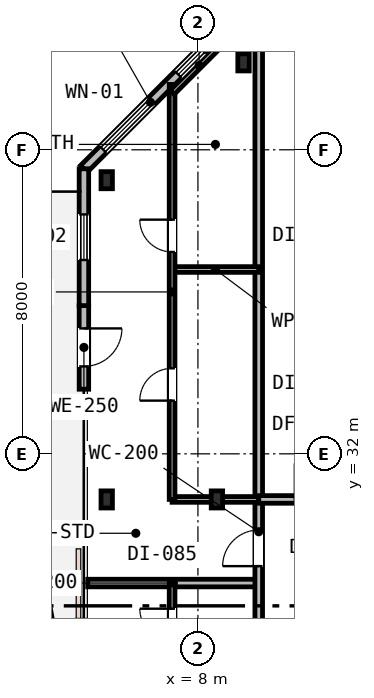
"""IFC4 building model, lengths in metres.
Left out: names, types, materials, properties, quantities, classifications, styles, units other than length and angle.
Written with IfcOpenShell. Run it as: python <this file> out.ifc"""

import sys

from ifc_helpers import new_model, si_unit, direction, frame, frame_2d, origin, origin_2d, place, context, subcontext, project, spatial, rectangle, i_section, extrude, element, fill, save


model = new_model("IFC4")
c1 = context("Model", 3, precision=1e-05, world=origin(), true_north=direction((0.0, 1.0)))
c2 = subcontext(c1, "Body", "Model", "MODEL_VIEW")
j1 = project(units=[si_unit("LENGTHUNIT", "METRE"), si_unit("PLANEANGLEUNIT", "RADIAN")], contexts=[c1])
p1 = place(None, origin())
s1 = spatial("IfcSite", under=j1, at=p1, CompositionType="ELEMENT")
p2 = place(p1, origin())
s2 = spatial("IfcBuilding", under=s1, at=p2, CompositionType="ELEMENT")
p3 = place(p2, frame((0.0, 0.0, 193.8)))
s3 = spatial("IfcBuildingStorey", under=s2, at=p3, CompositionType="ELEMENT", Elevation=193.8)
for number, where, z_axis, x_axis in (
    (1, (5.6, 30.8, 0.0), (0.0, 0.0, 1.0), (1.0, 0.0, 0.0)),
    (2, (5.6, 39.2, 0.0), (0.0, 0.0, 1.0), (1.0, 0.0, 0.0)),
    (3, (8.5, 30.8, 0.0), (0.0, 0.0, 1.0), (1.0, 0.0, 0.0)),
    (4, (9.2, 42.3, 0.0), (0.0, 0.0, 1.0), (1.0, 0.0, 0.0)),
):
    element("IfcColumn", number, at=place(p3, frame(where, z_axis=z_axis, x_axis=x_axis)), inside=s3, PredefinedType="COLUMN", context=c2, shape_type="SweptSolid", body=[
        extrude(i_section(OverallWidth=0.3, OverallDepth=0.45, WebThickness=0.014, FlangeThickness=0.026, FilletRadius=0.027, at=origin_2d()), origin(), (0.0, 0.0, 1.0), 3.6),
    ])
p4 = place(p3, frame((8.5, 43.0, 0.0), z_axis=(0.0, 0.0, 1.0), x_axis=(-0.707106781187, -0.707106781187, 0.0)))
e5 = element("IfcWall", 5, at=p4, inside=s3, PredefinedType="STANDARD", context=c2, shape_type="SweptSolid", body=[
    extrude(rectangle(XDim=4.95, YDim=0.25, at=frame_2d((2.475, 0.0))), origin(), (0.0, 0.0, 1.0), 3.33),
])
p5 = place(p4, frame((0.54, 0.0, 0.9)))
e6 = element("IfcOpeningElement", 6, at=p5, cuts=e5, PredefinedType="OPENING", context=c2, shape_type="SweptSolid", body=[
    extrude(rectangle(XDim=0.9, YDim=1.55, at=frame_2d((0.45, 0.775))), frame((0.0, 0.135, 0.0), z_axis=(0.0, -1.0, 0.0), x_axis=(1.0, 0.0, 0.0)), (0.0, 0.0, 1.0), 0.27),
])
p6 = place(p4, frame((2.435, 0.0, 0.75)))
e7 = element("IfcOpeningElement", 7, at=p6, cuts=e5, PredefinedType="OPENING", context=c2, shape_type="SweptSolid", body=[
    extrude(rectangle(XDim=1.8, YDim=1.85, at=frame_2d((0.9, 0.925))), frame((0.0, 0.135, 0.0), z_axis=(0.0, -1.0, 0.0), x_axis=(1.0, 0.0, 0.0)), (0.0, 0.0, 1.0), 0.27),
])
p7 = place(p3, frame((5.0, 35.9, 0.0), z_axis=(0.0, 0.0, 1.0), x_axis=(0.0, -1.0, 0.0)))
e8 = element("IfcWall", 8, at=p7, inside=s3, PredefinedType="STANDARD", context=c2, shape_type="SweptSolid", body=[
    extrude(rectangle(XDim=2.2, YDim=0.25, at=frame_2d((1.1, 0.0))), origin(), (0.0, 0.0, 1.0), 3.33),
])
p8 = place(p7, frame((0.6, 0.0, 0.0)))
e9 = element("IfcOpeningElement", 9, at=p8, cuts=e8, PredefinedType="OPENING", context=c2, shape_type="SweptSolid", body=[
    extrude(rectangle(XDim=1.0, YDim=2.15, at=frame_2d((0.5, 1.075))), frame((0.0, 0.135, 0.0), z_axis=(0.0, -1.0, 0.0), x_axis=(1.0, 0.0, 0.0)), (0.0, 0.0, 1.0), 0.27),
])
p9 = place(p3, frame((5.0, 39.5, 0.0), z_axis=(0.0, 0.0, 1.0), x_axis=(0.0, -1.0, 0.0)))
e10 = element("IfcWall", 10, at=p9, inside=s3, PredefinedType="STANDARD", context=c2, shape_type="SweptSolid", body=[
    extrude(rectangle(XDim=3.6, YDim=0.25, at=frame_2d((1.8, 0.0))), origin(), (0.0, 0.0, 1.0), 3.33),
])
p10 = place(p9, frame((1.2, 0.0, 0.85)))
e11 = element("IfcOpeningElement", 11, at=p10, cuts=e10, PredefinedType="OPENING", context=c2, shape_type="SweptSolid", body=[
    extrude(rectangle(XDim=1.2, YDim=1.6, at=frame_2d((0.6, 0.8))), frame((0.0, 0.135, 0.0), z_axis=(0.0, -1.0, 0.0), x_axis=(1.0, 0.0, 0.0)), (0.0, 0.0, 1.0), 0.27),
])
p11 = place(p3, frame((5.1, 28.6, 0.0), z_axis=(0.0, 0.0, 1.0), x_axis=(1.0, 0.0, 0.0)))
e12 = element("IfcWall", 12, at=p11, inside=s3, PredefinedType="PARTITIONING", context=c2, shape_type="SweptSolid", body=[
    extrude(rectangle(XDim=4.5, YDim=0.2, at=frame_2d((2.25, 0.0))), origin(), (0.0, 0.0, 1.0), 2.92),
])
p12 = place(p3, frame((9.6, 17.0, 0.0), z_axis=(0.0, 0.0, 1.0), x_axis=(0.0, 1.0, 0.0)))
e13 = element("IfcWall", 13, at=p12, inside=s3, PredefinedType="PARTITIONING", context=c2, shape_type="SweptSolid", body=[
    extrude(rectangle(XDim=25.9, YDim=0.2, at=frame_2d((12.95, 0.0))), origin(), (0.0, 0.0, 1.0), 2.92),
])
p13 = place(p12, frame((12.045, 0.0, 0.0)))
e14 = element("IfcOpeningElement", 14, at=p13, cuts=e13, PredefinedType="OPENING", context=c2, shape_type="SweptSolid", body=[
    extrude(rectangle(XDim=0.95, YDim=2.15, at=frame_2d((0.475, 1.075))), frame((0.0, 0.11, 0.0), z_axis=(0.0, -1.0, 0.0), x_axis=(1.0, 0.0, 0.0)), (0.0, 0.0, 1.0), 0.22),
])
p14 = place(p12, frame((3.125, 0.0, 0.0)))
e15 = element("IfcOpeningElement", 15, at=p14, cuts=e13, PredefinedType="OPENING", context=c2, shape_type="SweptSolid", body=[
    extrude(rectangle(XDim=0.95, YDim=2.15, at=frame_2d((0.475, 1.075))), frame((0.0, 0.11, 0.0), z_axis=(0.0, -1.0, 0.0), x_axis=(1.0, 0.0, 0.0)), (0.0, 0.0, 1.0), 0.22),
])
p15 = place(p3, frame((7.32, 30.8, 0.0), z_axis=(0.0, 0.0, 1.0), x_axis=(1.0, 0.0, 0.0)))
e16 = element("IfcWall", 16, at=p15, inside=s3, PredefinedType="PARTITIONING", context=c2, shape_type="SweptSolid", body=[
    extrude(rectangle(XDim=2.28, YDim=0.15, at=frame_2d((1.14, 0.0))), origin(), (0.0, 0.0, 1.0), 2.92),
])
p16 = place(p3, frame((7.32, 36.85, 0.0), z_axis=(0.0, 0.0, 1.0), x_axis=(1.0, 0.0, 0.0)))
e17 = element("IfcWall", 17, at=p16, inside=s3, PredefinedType="PARTITIONING", context=c2, shape_type="SweptSolid", body=[
    extrude(rectangle(XDim=2.28, YDim=0.15, at=frame_2d((1.14, 0.0))), origin(), (0.0, 0.0, 1.0), 3.33),
])
p17 = place(p3, frame((7.32, 30.8, 0.0), z_axis=(0.0, 0.0, 1.0), x_axis=(0.0, 1.0, 0.0)))
e18 = element("IfcWall", 18, at=p17, inside=s3, PredefinedType="PARTITIONING", context=c2, shape_type="SweptSolid", body=[
    extrude(rectangle(XDim=10.92, YDim=0.15, at=frame_2d((5.46, 0.0))), origin(), (0.0, 0.0, 1.0), 2.92),
])
p18 = place(p17, frame((2.6, 0.0, 0.0)))
e19 = element("IfcOpeningElement", 19, at=p18, cuts=e18, PredefinedType="OPENING", context=c2, shape_type="SweptSolid", body=[
    extrude(rectangle(XDim=0.85, YDim=2.15, at=frame_2d((0.425, 1.075))), frame((0.0, 0.085, 0.0), z_axis=(0.0, -1.0, 0.0), x_axis=(1.0, 0.0, 0.0)), (0.0, 0.0, 1.0), 0.17),
])
p19 = place(p17, frame((6.512, 0.0, 0.0)))
e20 = element("IfcOpeningElement", 20, at=p19, cuts=e18, PredefinedType="OPENING", context=c2, shape_type="SweptSolid", body=[
    extrude(rectangle(XDim=0.85, YDim=2.15, at=frame_2d((0.425, 1.075))), frame((0.0, 0.085, 0.0), z_axis=(0.0, -1.0, 0.0), x_axis=(1.0, 0.0, 0.0)), (0.0, 0.0, 1.0), 0.17),
])
p20 = place(p3, frame((7.32, 41.509, 0.0), z_axis=(0.0, 0.0, 1.0), x_axis=(0.707106781187, 0.707106781187, 0.0)))
e21 = element("IfcWall", 21, at=p20, inside=s3, PredefinedType="PARTITIONING", context=c2, shape_type="SweptSolid", body=[
    extrude(rectangle(XDim=2.009, YDim=0.15, at=frame_2d((1.004, 0.0))), origin(), (0.0, 0.0, 1.0), 3.33),
])
p21 = place(p3, frame((9.6, 30.8, 0.0), z_axis=(0.0, 0.0, 1.0), x_axis=(1.0, 0.0, 0.0)))
e22 = element("IfcWall", 22, at=p21, inside=s3, PredefinedType="PARTITIONING", context=c2, shape_type="SweptSolid", body=[
    extrude(rectangle(XDim=6.3, YDim=0.2, at=frame_2d((3.15, 0.0))), origin(), (0.0, 0.0, 1.0), 2.92),
])
p22 = place(p21, frame((0.95, 0.0, 0.0)))
e23 = element("IfcOpeningElement", 23, at=p22, cuts=e22, PredefinedType="OPENING", context=c2, shape_type="SweptSolid", body=[
    extrude(rectangle(XDim=0.95, YDim=2.15, at=frame_2d((0.475, 1.075))), frame((0.0, 0.11, 0.0), z_axis=(0.0, -1.0, 0.0), x_axis=(1.0, 0.0, 0.0)), (0.0, 0.0, 1.0), 0.22),
])
p23 = place(p21, frame((4.1, 0.0, 0.0)))
e24 = element("IfcOpeningElement", 24, at=p23, cuts=e22, PredefinedType="OPENING", context=c2, shape_type="SweptSolid", body=[
    extrude(rectangle(XDim=0.95, YDim=2.15, at=frame_2d((0.475, 1.075))), frame((0.0, 0.11, 0.0), z_axis=(0.0, -1.0, 0.0), x_axis=(1.0, 0.0, 0.0)), (0.0, 0.0, 1.0), 0.22),
])
p24 = place(p3, frame((7.32, 24.2, 0.0), z_axis=(0.0, 0.0, 1.0), x_axis=(0.0, 1.0, 0.0)))
e25 = element("IfcWall", 25, at=p24, inside=s3, PredefinedType="PARTITIONING", context=c2, shape_type="SweptSolid", body=[
    extrude(rectangle(XDim=4.4, YDim=0.15, at=frame_2d((2.2, 0.0))), origin(), (0.0, 0.0, 1.0), 2.92),
])
p25 = place(p24, frame((0.873, 0.0, 0.0)))
e26 = element("IfcOpeningElement", 26, at=p25, cuts=e25, PredefinedType="OPENING", context=c2, shape_type="SweptSolid", body=[
    extrude(rectangle(XDim=0.85, YDim=2.15, at=frame_2d((0.425, 1.075))), frame((0.0, 0.085, 0.0), z_axis=(0.0, -1.0, 0.0), x_axis=(1.0, 0.0, 0.0)), (0.0, 0.0, 1.0), 0.17),
])
p26 = place(p24, frame((2.875, 0.0, 0.0)))
e27 = element("IfcOpeningElement", 27, at=p26, cuts=e25, PredefinedType="OPENING", context=c2, shape_type="SweptSolid", body=[
    extrude(rectangle(XDim=0.85, YDim=2.15, at=frame_2d((0.425, 1.075))), frame((0.0, 0.085, 0.0), z_axis=(0.0, -1.0, 0.0), x_axis=(1.0, 0.0, 0.0)), (0.0, 0.0, 1.0), 0.17),
])
p27 = place(p5, origin())
e28 = element("IfcWindow", 28, at=p27, inside=s3, PartitioningType="SINGLE_PANEL", PredefinedType="WINDOW", context=c2, shape_type="SweptSolid", body=[
    extrude(rectangle(XDim=0.9, YDim=1.55, at=frame_2d((0.45, 0.775))), frame((0.0, 0.03, 0.0), z_axis=(0.0, -1.0, 0.0), x_axis=(1.0, 0.0, 0.0)), (0.0, 0.0, 1.0), 0.06),
])
fill(e6, e28)
p28 = place(p6, origin())
e29 = element("IfcWindow", 29, at=p28, inside=s3, PartitioningType="SINGLE_PANEL", PredefinedType="WINDOW", context=c2, shape_type="SweptSolid", body=[
    extrude(rectangle(XDim=1.8, YDim=1.85, at=frame_2d((0.9, 0.925))), frame((0.0, 0.03, 0.0), z_axis=(0.0, -1.0, 0.0), x_axis=(1.0, 0.0, 0.0)), (0.0, 0.0, 1.0), 0.06),
])
fill(e7, e29)
p29 = place(p8, origin())
e30 = element("IfcDoor", 30, at=p29, inside=s3, OperationType="SINGLE_SWING_LEFT", PredefinedType="DOOR", context=c2, shape_type="SweptSolid", body=[
    extrude(rectangle(XDim=1.0, YDim=2.15, at=frame_2d((0.5, 1.075))), frame((0.0, 0.025, 0.0), z_axis=(0.0, -1.0, 0.0), x_axis=(1.0, 0.0, 0.0)), (0.0, 0.0, 1.0), 0.05),
])
fill(e9, e30)
p30 = place(p10, origin())
e31 = element("IfcWindow", 31, at=p30, inside=s3, PartitioningType="SINGLE_PANEL", PredefinedType="WINDOW", context=c2, shape_type="SweptSolid", body=[
    extrude(rectangle(XDim=1.2, YDim=1.6, at=frame_2d((0.6, 0.8))), frame((0.0, 0.03, 0.0), z_axis=(0.0, -1.0, 0.0), x_axis=(1.0, 0.0, 0.0)), (0.0, 0.0, 1.0), 0.06),
])
fill(e11, e31)
p31 = place(p13, origin())
e32 = element("IfcDoor", 32, at=p31, inside=s3, OperationType="SINGLE_SWING_LEFT", PredefinedType="DOOR", context=c2, shape_type="SweptSolid", body=[
    extrude(rectangle(XDim=0.95, YDim=2.15, at=frame_2d((0.475, 1.075))), frame((0.0, 0.025, 0.0), z_axis=(0.0, -1.0, 0.0), x_axis=(1.0, 0.0, 0.0)), (0.0, 0.0, 1.0), 0.05),
])
fill(e14, e32)
p32 = place(p18, origin())
e33 = element("IfcDoor", 33, at=p32, inside=s3, OperationType="SINGLE_SWING_LEFT", PredefinedType="DOOR", context=c2, shape_type="SweptSolid", body=[
    extrude(rectangle(XDim=0.85, YDim=2.15, at=frame_2d((0.425, 1.075))), frame((0.0, 0.025, 0.0), z_axis=(0.0, -1.0, 0.0), x_axis=(1.0, 0.0, 0.0)), (0.0, 0.0, 1.0), 0.05),
])
fill(e19, e33)
p33 = place(p19, origin())
e34 = element("IfcDoor", 34, at=p33, inside=s3, OperationType="SINGLE_SWING_RIGHT", PredefinedType="DOOR", context=c2, shape_type="SweptSolid", body=[
    extrude(rectangle(XDim=0.85, YDim=2.15, at=frame_2d((0.425, 1.075))), frame((0.0, 0.025, 0.0), z_axis=(0.0, -1.0, 0.0), x_axis=(1.0, 0.0, 0.0)), (0.0, 0.0, 1.0), 0.05),
])
fill(e20, e34)
p34 = place(p26, origin())
e35 = element("IfcDoor", 35, at=p34, inside=s3, OperationType="SINGLE_SWING_RIGHT", PredefinedType="DOOR", context=c2, shape_type="SweptSolid", body=[
    extrude(rectangle(XDim=0.85, YDim=2.15, at=frame_2d((0.425, 1.075))), frame((0.0, 0.025, 0.0), z_axis=(0.0, -1.0, 0.0), x_axis=(1.0, 0.0, 0.0)), (0.0, 0.0, 1.0), 0.05),
])
fill(e27, e35)
save(model, sys.argv[1])
